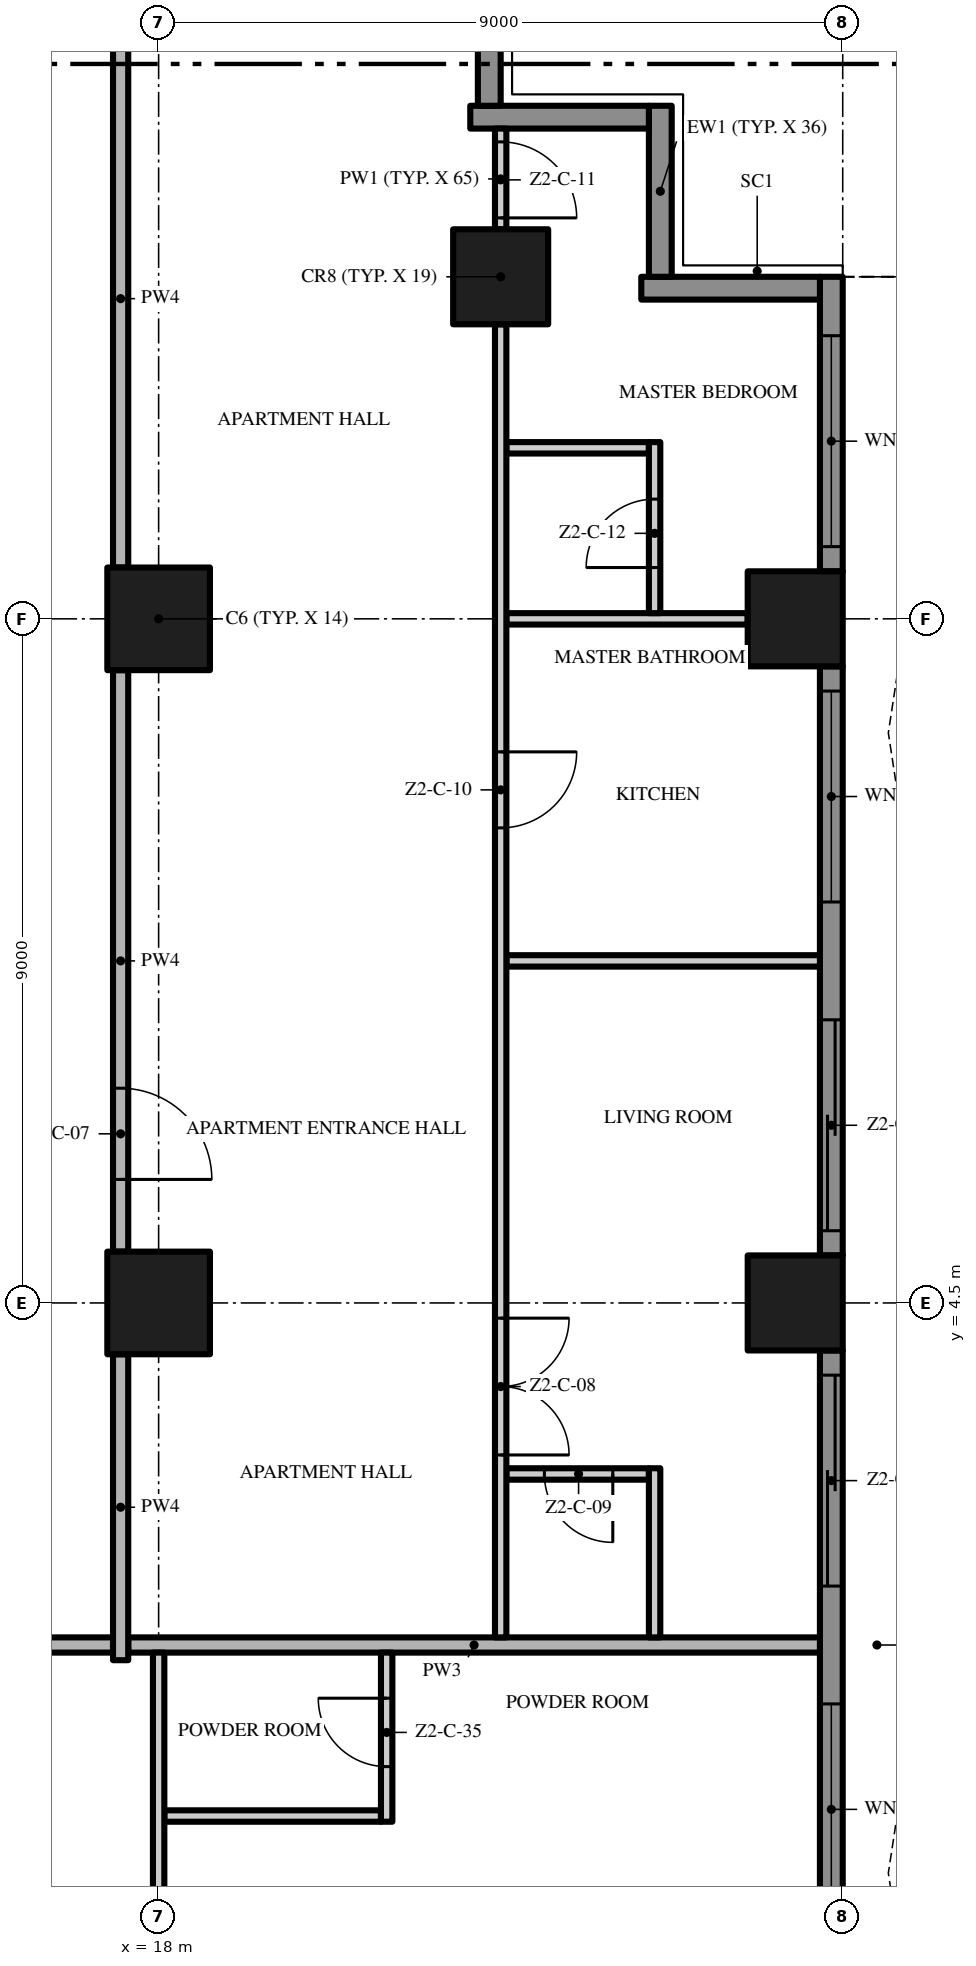
"""IFC4 building model, lengths in metres.
Left out: names, types, materials, properties, quantities, classifications, styles, units other than length and angle.
Written with IfcOpenShell. Run it as: python <this file> out.ifc"""

import sys

from ifc_helpers import new_model, si_unit, direction, frame, frame_2d, origin, origin_2d, place, context, subcontext, project, spatial, polyline, rectangle, outline, extrude, element, fill, save


model = new_model("IFC4")
c1 = context("Model", 3, precision=1e-05, world=origin(), true_north=direction((0.0, 1.0)))
c2 = subcontext(c1, "Body", "Model", "MODEL_VIEW")
j1 = project(units=[si_unit("LENGTHUNIT", "METRE"), si_unit("PLANEANGLEUNIT", "RADIAN")], contexts=[c1])
p1 = place(None, origin())
s1 = spatial("IfcSite", under=j1, at=p1, CompositionType="ELEMENT")
p2 = place(p1, origin())
s2 = spatial("IfcBuilding", under=s1, at=p2, CompositionType="ELEMENT")
p3 = place(p2, frame((0.0, 0.0, 99.8)))
s3 = spatial("IfcBuildingStorey", under=s2, at=p3, CompositionType="ELEMENT", Elevation=99.8)
for number, where, z_axis, x_axis in (
    (1, (18.0, 13.5, 0.0), (0.0, 0.0, 1.0), (1.0, 0.0, 0.0)),
    (2, (18.0, 4.5, 0.0), (0.0, 0.0, 1.0), (1.0, 0.0, 0.0)),
):
    element("IfcColumn", number, at=place(p3, frame(where, z_axis=z_axis, x_axis=x_axis)), inside=s3, PredefinedType="COLUMN", context=c2, shape_type="SweptSolid", body=[
        extrude(rectangle(XDim=1.35, YDim=1.35, at=origin_2d()), origin(), (0.0, 0.0, 1.0), 3.5),
    ])
for number, where, z_axis, x_axis in (
    (3, (26.375, 13.5, 0.0), (0.0, 0.0, 1.0), (1.0, 0.0, 0.0)),
    (4, (22.5, 18.0, 0.0), (0.0, 0.0, 1.0), (1.0, 0.0, 0.0)),
    (5, (26.375, 4.5, 0.0), (0.0, 0.0, 1.0), (1.0, 0.0, 0.0)),
):
    element("IfcColumn", number, at=place(p3, frame(where, z_axis=z_axis, x_axis=x_axis)), inside=s3, PredefinedType="COLUMN", context=c2, shape_type="SweptSolid", body=[
        extrude(rectangle(XDim=1.25, YDim=1.25, at=origin_2d()), origin(), (0.0, 0.0, 1.0), 3.5),
    ])
p4 = place(p3, frame((26.85, 3.875, 0.0), z_axis=(0.0, 0.0, 1.0), x_axis=(0.0, -1.0, 0.0)))
e6 = element("IfcWall", 6, at=p4, inside=s3, PredefinedType="SOLIDWALL", context=c2, shape_type="SweptSolid", body=[
    extrude(rectangle(XDim=7.75, YDim=0.3, at=frame_2d((3.875, 0.0))), origin(), (0.0, 0.0, 1.0), 3.5),
])
p5 = place(p4, frame((4.65, 0.0, 0.45)))
e7 = element("IfcOpeningElement", 7, at=p5, cuts=e6, PredefinedType="OPENING", context=c2, shape_type="SweptSolid", body=[
    extrude(rectangle(XDim=2.775, YDim=2.65, at=frame_2d((1.387, 1.325))), frame((0.0, 0.16, 0.0), z_axis=(0.0, -1.0, 0.0), x_axis=(1.0, 0.0, 0.0)), (0.0, 0.0, 1.0), 0.32),
])
p6 = place(p4, frame((0.325, 0.0, 0.0)))
e8 = element("IfcOpeningElement", 8, at=p6, cuts=e6, PredefinedType="OPENING", context=c2, shape_type="SweptSolid", body=[
    extrude(rectangle(XDim=2.775, YDim=2.4, at=frame_2d((1.387, 1.2))), frame((0.0, 0.16, 0.0), z_axis=(0.0, -1.0, 0.0), x_axis=(1.0, 0.0, 0.0)), (0.0, 0.0, 1.0), 0.32),
])
p7 = place(p3, frame((26.85, 12.875, 0.0), z_axis=(0.0, 0.0, 1.0), x_axis=(0.0, -1.0, 0.0)))
e9 = element("IfcWall", 9, at=p7, inside=s3, PredefinedType="SOLIDWALL", context=c2, shape_type="SweptSolid", body=[
    extrude(rectangle(XDim=7.75, YDim=0.3, at=frame_2d((3.875, 0.0))), origin(), (0.0, 0.0, 1.0), 3.5),
])
p8 = place(p7, frame((4.65, 0.0, 0.0)))
e10 = element("IfcOpeningElement", 10, at=p8, cuts=e9, PredefinedType="OPENING", context=c2, shape_type="SweptSolid", body=[
    extrude(rectangle(XDim=2.775, YDim=2.4, at=frame_2d((1.387, 1.2))), frame((0.0, 0.16, 0.0), z_axis=(0.0, -1.0, 0.0), x_axis=(1.0, 0.0, 0.0)), (0.0, 0.0, 1.0), 0.32),
])
p9 = place(p7, frame((0.325, 0.0, 0.45)))
e11 = element("IfcOpeningElement", 11, at=p9, cuts=e9, PredefinedType="OPENING", context=c2, shape_type="SweptSolid", body=[
    extrude(rectangle(XDim=2.775, YDim=2.65, at=frame_2d((1.387, 1.325))), frame((0.0, 0.16, 0.0), z_axis=(0.0, -1.0, 0.0), x_axis=(1.0, 0.0, 0.0)), (0.0, 0.0, 1.0), 0.32),
])
p10 = place(p3, frame((26.85, 18.0, 0.0), z_axis=(0.0, 0.0, 1.0), x_axis=(0.0, -1.0, 0.0)))
e12 = element("IfcWall", 12, at=p10, inside=s3, PredefinedType="SOLIDWALL", context=c2, shape_type="SweptSolid", body=[
    extrude(rectangle(XDim=3.875, YDim=0.3, at=frame_2d((1.938, 0.0))), origin(), (0.0, 0.0, 1.0), 3.5),
])
p11 = place(p10, frame((0.775, 0.0, 0.45)))
e13 = element("IfcOpeningElement", 13, at=p11, cuts=e12, PredefinedType="OPENING", context=c2, shape_type="SweptSolid", body=[
    extrude(rectangle(XDim=2.775, YDim=2.65, at=frame_2d((1.387, 1.325))), frame((0.0, 0.16, 0.0), z_axis=(0.0, -1.0, 0.0), x_axis=(1.0, 0.0, 0.0)), (0.0, 0.0, 1.0), 0.32),
])
p12 = place(p3, frame((24.35, 17.85, 0.0), z_axis=(0.0, 0.0, 1.0), x_axis=(1.0, 0.0, 0.0)))
e14 = element("IfcWall", 14, at=p12, inside=s3, PredefinedType="SOLIDWALL", context=c2, shape_type="SweptSolid", body=[
    extrude(rectangle(XDim=2.35, YDim=0.3, at=frame_2d((1.175, 0.0))), origin(), (0.0, 0.0, 1.0), 3.5),
])
p13 = place(p3, frame((24.6, 20.25, 0.0), z_axis=(0.0, 0.0, 1.0), x_axis=(0.0, -1.0, 0.0)))
e15 = element("IfcWall", 15, at=p13, inside=s3, PredefinedType="SOLIDWALL", context=c2, shape_type="SweptSolid", body=[
    extrude(rectangle(XDim=2.25, YDim=0.3, at=frame_2d((1.125, 0.0))), origin(), (0.0, 0.0, 1.0), 3.5),
])
p14 = place(p3, frame((22.1, 20.1, 0.0), z_axis=(0.0, 0.0, 1.0), x_axis=(1.0, 0.0, 0.0)))
e16 = element("IfcWall", 16, at=p14, inside=s3, PredefinedType="SOLIDWALL", context=c2, shape_type="SweptSolid", body=[
    extrude(rectangle(XDim=2.35, YDim=0.3, at=frame_2d((1.175, 0.0))), origin(), (0.0, 0.0, 1.0), 3.5),
])
p15 = place(p3, frame((22.35, 22.5, 0.0), z_axis=(0.0, 0.0, 1.0), x_axis=(0.0, -1.0, 0.0)))
e17 = element("IfcWall", 17, at=p15, inside=s3, PredefinedType="SOLIDWALL", context=c2, shape_type="SweptSolid", body=[
    extrude(rectangle(XDim=2.25, YDim=0.3, at=frame_2d((1.125, 0.0))), origin(), (0.0, 0.0, 1.0), 3.5),
])
p16 = place(p3, origin())
e18 = element("IfcWall", 18, at=p16, inside=s3, PredefinedType="USERDEFINED", context=c2, shape_type="SweptSolid", body=[
    extrude(outline(polyline([(27.6, -18.0), (27.829, -16.5), (28.429, -15.0), (29.171, -13.5), (29.771, -12.0), (30.0, -10.5), (29.771, -9.0), (29.171, -7.5), (28.429, -6.0), (27.829, -4.5), (27.6, -3.0), (27.829, -1.5), (28.429, 0.0), (29.171, 1.5), (29.771, 3.0), (30.0, 4.5), (29.771, 6.0), (29.171, 7.5), (28.429, 9.0), (27.829, 10.5), (27.6, 12.0), (27.829, 13.5), (28.429, 15.0), (29.171, 16.5), (29.771, 18.0), (29.539, 18.093), (28.942, 16.602), (28.201, 15.102), (27.586, 13.566), (27.347, 12.0), (27.586, 10.434), (28.201, 8.898), (28.942, 7.398), (29.528, 5.934), (29.747, 4.5), (29.528, 3.066), (28.942, 1.602), (28.201, 0.102), (27.586, -1.434), (27.347, -3.0), (27.586, -4.566), (28.201, -6.102), (28.942, -7.602), (29.528, -9.066), (29.747, -10.5), (29.528, -11.934), (28.942, -13.398), (28.201, -14.898), (27.586, -16.434), (27.353, -17.962), (27.6, -18.0)])), origin(), (0.0, 0.0, 1.0), 0.9),
])
p17 = place(p3, frame((18.075, -2.25, 0.0), z_axis=(0.0, 0.0, 1.0), x_axis=(1.0, 0.0, 0.0)))
e19 = element("IfcWall", 19, at=p17, inside=s3, PredefinedType="PARTITIONING", context=c2, shape_type="SweptSolid", body=[
    extrude(rectangle(XDim=2.85, YDim=0.15, at=frame_2d((1.425, 0.0))), origin(), (0.0, 0.0, 1.0), 3.5),
])
p18 = place(p3, frame((4.6, 0.0, 0.0), z_axis=(0.0, 0.0, 1.0), x_axis=(1.0, 0.0, 0.0)))
e20 = element("IfcWall", 20, at=p18, inside=s3, PredefinedType="PARTITIONING", context=c2, shape_type="SweptSolid", body=[
    extrude(rectangle(XDim=12.8, YDim=0.2, at=frame_2d((6.4, 0.0))), origin(), (0.0, 0.0, 1.0), 3.5),
])
p19 = place(p3, frame((17.6, 0.0, 0.0), z_axis=(0.0, 0.0, 1.0), x_axis=(1.0, 0.0, 0.0)))
e21 = element("IfcWall", 21, at=p19, inside=s3, PredefinedType="PARTITIONING", context=c2, shape_type="SweptSolid", body=[
    extrude(rectangle(XDim=9.1, YDim=0.2, at=frame_2d((4.55, 0.0))), origin(), (0.0, 0.0, 1.0), 3.5),
])
p20 = place(p3, frame((24.45, 2.25, 0.0), z_axis=(0.0, 0.0, 1.0), x_axis=(-1.0, 0.0, 0.0)))
e22 = element("IfcWall", 22, at=p20, inside=s3, PredefinedType="PARTITIONING", context=c2, shape_type="SweptSolid", body=[
    extrude(rectangle(XDim=1.875, YDim=0.15, at=frame_2d((0.938, 0.0))), origin(), (0.0, 0.0, 1.0), 3.5),
])
p21 = place(p20, frame((0.475, 0.0, 0.0)))
e23 = element("IfcOpeningElement", 23, at=p21, cuts=e22, PredefinedType="OPENING", context=c2, shape_type="SweptSolid", body=[
    extrude(rectangle(XDim=0.9, YDim=2.1, at=frame_2d((0.45, 1.05))), frame((0.0, 0.085, 0.0), z_axis=(0.0, -1.0, 0.0), x_axis=(1.0, 0.0, 0.0)), (0.0, 0.0, 1.0), 0.17),
])
p22 = place(p3, frame((22.575, 9.0, 0.0), z_axis=(0.0, 0.0, 1.0), x_axis=(1.0, 0.0, 0.0)))
e24 = element("IfcWall", 24, at=p22, inside=s3, PredefinedType="PARTITIONING", context=c2, shape_type="SweptSolid", body=[
    extrude(rectangle(XDim=4.125, YDim=0.15, at=frame_2d((2.062, 0.0))), origin(), (0.0, 0.0, 1.0), 3.5),
])
p23 = place(p3, frame((22.575, 13.5, 0.0), z_axis=(0.0, 0.0, 1.0), x_axis=(1.0, 0.0, 0.0)))
e25 = element("IfcWall", 25, at=p23, inside=s3, PredefinedType="PARTITIONING", context=c2, shape_type="SweptSolid", body=[
    extrude(rectangle(XDim=3.175, YDim=0.15, at=frame_2d((1.587, 0.0))), origin(), (0.0, 0.0, 1.0), 3.5),
])
p24 = place(p3, frame((22.575, 15.75, 0.0), z_axis=(0.0, 0.0, 1.0), x_axis=(1.0, 0.0, 0.0)))
e26 = element("IfcWall", 26, at=p24, inside=s3, PredefinedType="PARTITIONING", context=c2, shape_type="SweptSolid", body=[
    extrude(rectangle(XDim=1.875, YDim=0.15, at=frame_2d((0.938, 0.0))), origin(), (0.0, 0.0, 1.0), 3.5),
])
p25 = place(p3, frame((17.5, -0.2, 0.0), z_axis=(0.0, 0.0, 1.0), x_axis=(0.0, 1.0, 0.0)))
e27 = element("IfcWall", 27, at=p25, inside=s3, PredefinedType="PARTITIONING", context=c2, shape_type="SweptSolid", body=[
    extrude(rectangle(XDim=4.025, YDim=0.2, at=frame_2d((2.013, 0.0))), origin(), (0.0, 0.0, 1.0), 3.5),
])
p26 = place(p3, frame((17.5, 12.825, 0.0), z_axis=(0.0, 0.0, 1.0), x_axis=(0.0, -1.0, 0.0)))
e28 = element("IfcWall", 28, at=p26, inside=s3, PredefinedType="PARTITIONING", context=c2, shape_type="SweptSolid", body=[
    extrude(rectangle(XDim=7.65, YDim=0.2, at=frame_2d((3.825, 0.0))), origin(), (0.0, 0.0, 1.0), 3.5),
])
p27 = place(p26, frame((5.5, 0.0, 0.0)))
e29 = element("IfcOpeningElement", 29, at=p27, cuts=e28, PredefinedType="OPENING", context=c2, shape_type="SweptSolid", body=[
    extrude(rectangle(XDim=1.2, YDim=2.4, at=frame_2d((0.6, 1.2))), frame((0.0, 0.11, 0.0), z_axis=(0.0, -1.0, 0.0), x_axis=(1.0, 0.0, 0.0)), (0.0, 0.0, 1.0), 0.22),
])
p28 = place(p3, frame((17.5, 14.175, 0.0), z_axis=(0.0, 0.0, 1.0), x_axis=(0.0, 1.0, 0.0)))
e30 = element("IfcWall", 30, at=p28, inside=s3, PredefinedType="PARTITIONING", context=c2, shape_type="SweptSolid", body=[
    extrude(rectangle(XDim=7.075, YDim=0.2, at=frame_2d((3.538, 0.0))), origin(), (0.0, 0.0, 1.0), 3.5),
])
p29 = place(p3, frame((18.0, -3.825, 0.0), z_axis=(0.0, 0.0, 1.0), x_axis=(0.0, 1.0, 0.0)))
e31 = element("IfcWall", 31, at=p29, inside=s3, PredefinedType="PARTITIONING", context=c2, shape_type="SweptSolid", body=[
    extrude(rectangle(XDim=3.725, YDim=0.15, at=frame_2d((1.863, 0.0))), origin(), (0.0, 0.0, 1.0), 3.5),
])
p30 = place(p3, frame((21.0, -2.325, 0.0), z_axis=(0.0, 0.0, 1.0), x_axis=(0.0, 1.0, 0.0)))
e32 = element("IfcWall", 32, at=p30, inside=s3, PredefinedType="PARTITIONING", context=c2, shape_type="SweptSolid", body=[
    extrude(rectangle(XDim=2.225, YDim=0.15, at=frame_2d((1.113, 0.0))), origin(), (0.0, 0.0, 1.0), 3.5),
])
p31 = place(p30, frame((0.725, 0.0, 0.0)))
e33 = element("IfcOpeningElement", 33, at=p31, cuts=e32, PredefinedType="OPENING", context=c2, shape_type="SweptSolid", body=[
    extrude(rectangle(XDim=0.9, YDim=2.1, at=frame_2d((0.45, 1.05))), frame((0.0, 0.085, 0.0), z_axis=(0.0, -1.0, 0.0), x_axis=(1.0, 0.0, 0.0)), (0.0, 0.0, 1.0), 0.17),
])
p32 = place(p3, frame((22.5, 17.375, 0.0), z_axis=(0.0, 0.0, 1.0), x_axis=(0.0, -1.0, 0.0)))
e34 = element("IfcWall", 34, at=p32, inside=s3, PredefinedType="PARTITIONING", context=c2, shape_type="SweptSolid", body=[
    extrude(rectangle(XDim=17.275, YDim=0.15, at=frame_2d((8.637, 0.0))), origin(), (0.0, 0.0, 1.0), 3.5),
])
p33 = place(p32, frame((13.075, 0.0, 0.0)))
e35 = element("IfcOpeningElement", 35, at=p33, cuts=e34, PredefinedType="OPENING", context=c2, shape_type="SweptSolid", body=[
    extrude(rectangle(XDim=1.8, YDim=2.4, at=frame_2d((0.9, 1.2))), frame((0.0, 0.085, 0.0), z_axis=(0.0, -1.0, 0.0), x_axis=(1.0, 0.0, 0.0)), (0.0, 0.0, 1.0), 0.17),
])
p34 = place(p32, frame((5.625, 0.0, 0.0)))
e36 = element("IfcOpeningElement", 36, at=p34, cuts=e34, PredefinedType="OPENING", context=c2, shape_type="SweptSolid", body=[
    extrude(rectangle(XDim=1.0, YDim=2.4, at=frame_2d((0.5, 1.2))), frame((0.0, 0.085, 0.0), z_axis=(0.0, -1.0, 0.0), x_axis=(1.0, 0.0, 0.0)), (0.0, 0.0, 1.0), 0.17),
])
p35 = place(p3, frame((22.5, 19.95, 0.0), z_axis=(0.0, 0.0, 1.0), x_axis=(0.0, -1.0, 0.0)))
e37 = element("IfcWall", 37, at=p35, inside=s3, PredefinedType="PARTITIONING", context=c2, shape_type="SweptSolid", body=[
    extrude(rectangle(XDim=1.325, YDim=0.15, at=frame_2d((0.662, 0.0))), origin(), (0.0, 0.0, 1.0), 3.5),
])
p36 = place(p35, frame((0.175, 0.0, 0.0)))
e38 = element("IfcOpeningElement", 38, at=p36, cuts=e37, PredefinedType="OPENING", context=c2, shape_type="SweptSolid", body=[
    extrude(rectangle(XDim=1.0, YDim=2.4, at=frame_2d((0.5, 1.2))), frame((0.0, 0.085, 0.0), z_axis=(0.0, -1.0, 0.0), x_axis=(1.0, 0.0, 0.0)), (0.0, 0.0, 1.0), 0.17),
])
p37 = place(p3, frame((24.525, 0.1, 0.0), z_axis=(0.0, 0.0, 1.0), x_axis=(0.0, 1.0, 0.0)))
e39 = element("IfcWall", 39, at=p37, inside=s3, PredefinedType="PARTITIONING", context=c2, shape_type="SweptSolid", body=[
    extrude(rectangle(XDim=2.225, YDim=0.15, at=frame_2d((1.113, 0.0))), origin(), (0.0, 0.0, 1.0), 3.5),
])
p38 = place(p3, frame((24.525, 13.575, 0.0), z_axis=(0.0, 0.0, 1.0), x_axis=(0.0, 1.0, 0.0)))
e40 = element("IfcWall", 40, at=p38, inside=s3, PredefinedType="PARTITIONING", context=c2, shape_type="SweptSolid", body=[
    extrude(rectangle(XDim=2.25, YDim=0.15, at=frame_2d((1.125, 0.0))), origin(), (0.0, 0.0, 1.0), 3.5),
])
p39 = place(p38, frame((0.6, 0.0, 0.0)))
e41 = element("IfcOpeningElement", 41, at=p39, cuts=e40, PredefinedType="OPENING", context=c2, shape_type="SweptSolid", body=[
    extrude(rectangle(XDim=0.9, YDim=2.1, at=frame_2d((0.45, 1.05))), frame((0.0, 0.085, 0.0), z_axis=(0.0, -1.0, 0.0), x_axis=(1.0, 0.0, 0.0)), (0.0, 0.0, 1.0), 0.17),
])
p40 = place(p5, origin())
e42 = element("IfcWindow", 42, at=p40, inside=s3, PartitioningType="SINGLE_PANEL", PredefinedType="WINDOW", context=c2, shape_type="SweptSolid", body=[
    extrude(rectangle(XDim=2.775, YDim=2.65, at=frame_2d((1.387, 1.325))), frame((0.0, 0.03, 0.0), z_axis=(0.0, -1.0, 0.0), x_axis=(1.0, 0.0, 0.0)), (0.0, 0.0, 1.0), 0.06),
])
fill(e7, e42)
p41 = place(p6, origin())
e43 = element("IfcDoor", 43, at=p41, inside=s3, OperationType="SINGLE_SWING_LEFT", PredefinedType="DOOR", context=c2, shape_type="SweptSolid", body=[
    extrude(rectangle(XDim=2.775, YDim=2.4, at=frame_2d((1.387, 1.2))), frame((0.0, 0.025, 0.0), z_axis=(0.0, -1.0, 0.0), x_axis=(1.0, 0.0, 0.0)), (0.0, 0.0, 1.0), 0.05),
])
fill(e8, e43)
p42 = place(p8, origin())
e44 = element("IfcDoor", 44, at=p42, inside=s3, OperationType="SINGLE_SWING_LEFT", PredefinedType="DOOR", context=c2, shape_type="SweptSolid", body=[
    extrude(rectangle(XDim=2.775, YDim=2.4, at=frame_2d((1.387, 1.2))), frame((0.0, 0.025, 0.0), z_axis=(0.0, -1.0, 0.0), x_axis=(1.0, 0.0, 0.0)), (0.0, 0.0, 1.0), 0.05),
])
fill(e10, e44)
p43 = place(p9, origin())
e45 = element("IfcWindow", 45, at=p43, inside=s3, PartitioningType="SINGLE_PANEL", PredefinedType="WINDOW", context=c2, shape_type="SweptSolid", body=[
    extrude(rectangle(XDim=2.775, YDim=2.65, at=frame_2d((1.387, 1.325))), frame((0.0, 0.03, 0.0), z_axis=(0.0, -1.0, 0.0), x_axis=(1.0, 0.0, 0.0)), (0.0, 0.0, 1.0), 0.06),
])
fill(e11, e45)
p44 = place(p11, origin())
e46 = element("IfcWindow", 46, at=p44, inside=s3, PartitioningType="SINGLE_PANEL", PredefinedType="WINDOW", context=c2, shape_type="SweptSolid", body=[
    extrude(rectangle(XDim=2.775, YDim=2.65, at=frame_2d((1.387, 1.325))), frame((0.0, 0.03, 0.0), z_axis=(0.0, -1.0, 0.0), x_axis=(1.0, 0.0, 0.0)), (0.0, 0.0, 1.0), 0.06),
])
fill(e13, e46)
p45 = place(p27, origin())
e47 = element("IfcDoor", 47, at=p45, inside=s3, OperationType="SINGLE_SWING_RIGHT", PredefinedType="DOOR", context=c2, shape_type="SweptSolid", body=[
    extrude(rectangle(XDim=1.2, YDim=2.4, at=frame_2d((0.6, 1.2))), frame((0.0, 0.025, 0.0), z_axis=(0.0, -1.0, 0.0), x_axis=(1.0, 0.0, 0.0)), (0.0, 0.0, 1.0), 0.05),
])
fill(e29, e47)
p46 = place(p33, origin())
e48 = element("IfcDoor", 48, at=p46, inside=s3, OperationType="DOUBLE_DOOR_SINGLE_SWING", PredefinedType="DOOR", context=c2, shape_type="SweptSolid", body=[
    extrude(rectangle(XDim=1.8, YDim=2.4, at=frame_2d((0.9, 1.2))), frame((0.0, 0.025, 0.0), z_axis=(0.0, -1.0, 0.0), x_axis=(1.0, 0.0, 0.0)), (0.0, 0.0, 1.0), 0.05),
])
fill(e35, e48)
p47 = place(p21, origin())
e49 = element("IfcDoor", 49, at=p47, inside=s3, OperationType="SINGLE_SWING_LEFT", PredefinedType="DOOR", context=c2, shape_type="SweptSolid", body=[
    extrude(rectangle(XDim=0.9, YDim=2.1, at=frame_2d((0.45, 1.05))), frame((0.0, 0.025, 0.0), z_axis=(0.0, -1.0, 0.0), x_axis=(1.0, 0.0, 0.0)), (0.0, 0.0, 1.0), 0.05),
])
fill(e23, e49)
p48 = place(p34, origin())
e50 = element("IfcDoor", 50, at=p48, inside=s3, OperationType="SINGLE_SWING_LEFT", PredefinedType="DOOR", context=c2, shape_type="SweptSolid", body=[
    extrude(rectangle(XDim=1.0, YDim=2.4, at=frame_2d((0.5, 1.2))), frame((0.0, 0.025, 0.0), z_axis=(0.0, -1.0, 0.0), x_axis=(1.0, 0.0, 0.0)), (0.0, 0.0, 1.0), 0.05),
])
fill(e36, e50)
p49 = place(p36, origin())
e51 = element("IfcDoor", 51, at=p49, inside=s3, OperationType="SINGLE_SWING_RIGHT", PredefinedType="DOOR", context=c2, shape_type="SweptSolid", body=[
    extrude(rectangle(XDim=1.0, YDim=2.4, at=frame_2d((0.5, 1.2))), frame((0.0, 0.025, 0.0), z_axis=(0.0, -1.0, 0.0), x_axis=(1.0, 0.0, 0.0)), (0.0, 0.0, 1.0), 0.05),
])
fill(e38, e51)
p50 = place(p39, origin())
e52 = element("IfcDoor", 52, at=p50, inside=s3, OperationType="SINGLE_SWING_LEFT", PredefinedType="DOOR", context=c2, shape_type="SweptSolid", body=[
    extrude(rectangle(XDim=0.9, YDim=2.1, at=frame_2d((0.45, 1.05))), frame((0.0, 0.025, 0.0), z_axis=(0.0, -1.0, 0.0), x_axis=(1.0, 0.0, 0.0)), (0.0, 0.0, 1.0), 0.05),
])
fill(e41, e52)
p51 = place(p31, origin())
e53 = element("IfcDoor", 53, at=p51, inside=s3, OperationType="SINGLE_SWING_RIGHT", PredefinedType="DOOR", context=c2, shape_type="SweptSolid", body=[
    extrude(rectangle(XDim=0.9, YDim=2.1, at=frame_2d((0.45, 1.05))), frame((0.0, 0.025, 0.0), z_axis=(0.0, -1.0, 0.0), x_axis=(1.0, 0.0, 0.0)), (0.0, 0.0, 1.0), 0.05),
])
fill(e33, e53)
save(model, sys.argv[1])
